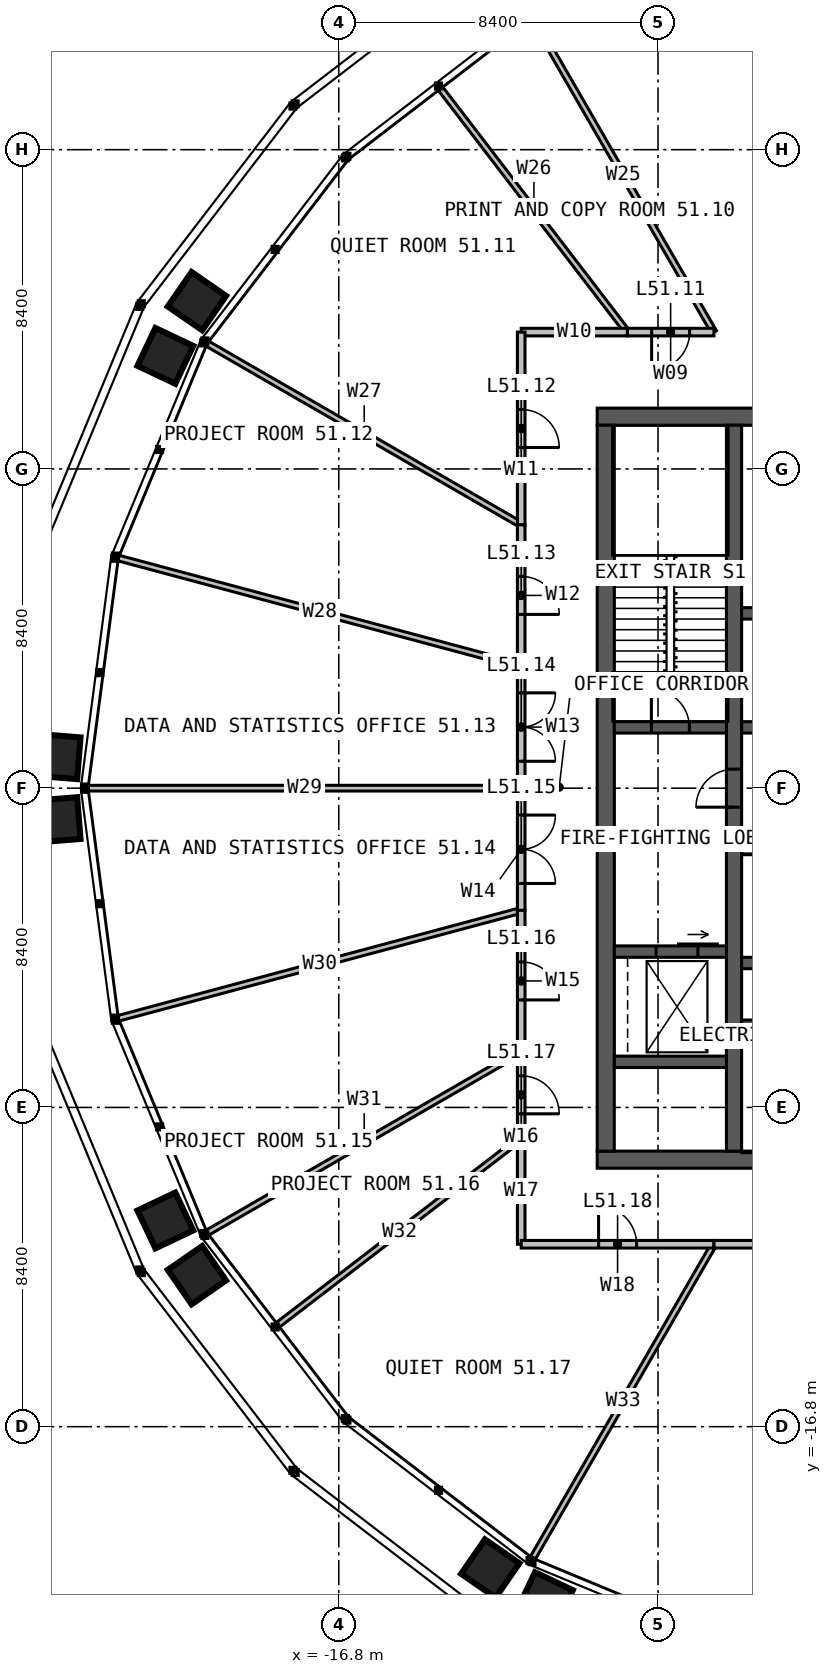
"""IFC4 building model, lengths in metres.
Left out: names, types, materials, properties, quantities, classifications, styles, units other than length and angle.
Written with IfcOpenShell. Run it as: python <this file> out.ifc"""

import sys

from ifc_helpers import new_model, si_unit, direction, frame, frame_2d, origin, place, context, subcontext, project, spatial, rectangle, extrude, element, fill, save


model = new_model("IFC4")
c1 = context("Model", 3, precision=1e-05, world=origin(), true_north=direction((0.0, 1.0)))
c2 = subcontext(c1, "Body", "Model", "MODEL_VIEW")
j1 = project(units=[si_unit("LENGTHUNIT", "METRE"), si_unit("PLANEANGLEUNIT", "RADIAN")], contexts=[c1])
p1 = place(None, origin())
s1 = spatial("IfcSite", under=j1, at=p1, CompositionType="ELEMENT")
p2 = place(p1, origin())
s2 = spatial("IfcBuilding", under=s1, at=p2, CompositionType="ELEMENT")
p3 = place(p2, frame((0.0, 0.0, 211.0)))
s3 = spatial("IfcBuildingStorey", under=s2, at=p3, CompositionType="ELEMENT", Elevation=211.0)
p4 = place(p3, frame((-10.0, 9.775, 0.0), z_axis=(0.0, 0.0, 1.0), x_axis=(1.0, 0.0, 0.0)))
e1 = element("IfcWall", 1, at=p4, inside=s3, PredefinedType="SOLIDWALL", context=c2, shape_type="SweptSolid", body=[
    extrude(rectangle(XDim=20.0, YDim=0.45, at=frame_2d((10.0, 0.0))), origin(), (0.0, 0.0, 1.0), 4.0),
])
p5 = place(p4, frame((9.4, 0.0, 0.0)))
e2 = element("IfcOpeningElement", 2, at=p5, cuts=e1, PredefinedType="OPENING", context=c2, shape_type="SweptSolid", body=[
    extrude(rectangle(XDim=1.2, YDim=2.2, at=frame_2d((0.6, 1.1))), frame((0.0, 0.235, 0.0), z_axis=(0.0, -1.0, 0.0), x_axis=(1.0, 0.0, 0.0)), (0.0, 0.0, 1.0), 0.47),
])
p6 = place(p3, frame((10.0, -9.775, 0.0), z_axis=(0.0, 0.0, 1.0), x_axis=(-1.0, 0.0, 0.0)))
e3 = element("IfcWall", 3, at=p6, inside=s3, PredefinedType="SOLIDWALL", context=c2, shape_type="SweptSolid", body=[
    extrude(rectangle(XDim=20.0, YDim=0.45, at=frame_2d((10.0, 0.0))), origin(), (0.0, 0.0, 1.0), 4.0),
])
p7 = place(p6, frame((6.875, 0.0, 0.0)))
e4 = element("IfcOpeningElement", 4, at=p7, cuts=e3, PredefinedType="OPENING", context=c2, shape_type="SweptSolid", body=[
    extrude(rectangle(XDim=1.2, YDim=2.2, at=frame_2d((0.6, 1.1))), frame((0.0, 0.235, 0.0), z_axis=(0.0, -1.0, 0.0), x_axis=(1.0, 0.0, 0.0)), (0.0, 0.0, 1.0), 0.47),
])
p8 = place(p3, frame((-9.775, 9.55, 0.0), z_axis=(0.0, 0.0, 1.0), x_axis=(0.0, -1.0, 0.0)))
e5 = element("IfcWall", 5, at=p8, inside=s3, PredefinedType="SOLIDWALL", context=c2, shape_type="SweptSolid", body=[
    extrude(rectangle(XDim=19.1, YDim=0.45, at=frame_2d((9.55, 0.0))), origin(), (0.0, 0.0, 1.0), 4.0),
])
p9 = place(p3, frame((-6.4, -9.55, 0.0), z_axis=(0.0, 0.0, 1.0), x_axis=(0.0, 1.0, 0.0)))
e6 = element("IfcWall", 6, at=p9, inside=s3, PredefinedType="SOLIDWALL", context=c2, shape_type="SweptSolid", body=[
    extrude(rectangle(XDim=19.1, YDim=0.4, at=frame_2d((9.55, 0.0))), origin(), (0.0, 0.0, 1.0), 4.0),
])
p10 = place(p9, frame((9.05, 0.0, 0.0)))
e7 = element("IfcOpeningElement", 7, at=p10, cuts=e6, PredefinedType="OPENING", context=c2, shape_type="SweptSolid", body=[
    extrude(rectangle(XDim=1.0, YDim=2.2, at=frame_2d((0.5, 1.1))), frame((0.0, 0.21, 0.0), z_axis=(0.0, -1.0, 0.0), x_axis=(1.0, 0.0, 0.0)), (0.0, 0.0, 1.0), 0.42),
])
p11 = place(p3, frame((-6.2, 1.6, 0.0), z_axis=(0.0, 0.0, 1.0), x_axis=(1.0, 0.0, 0.0)))
e8 = element("IfcWall", 8, at=p11, inside=s3, PredefinedType="SOLIDWALL", context=c2, shape_type="SweptSolid", body=[
    extrude(rectangle(XDim=4.85, YDim=0.3, at=frame_2d((2.425, 0.0))), origin(), (0.0, 0.0, 1.0), 4.0),
])
p12 = place(p11, frame((0.625, 0.0, 0.0)))
e9 = element("IfcOpeningElement", 9, at=p12, cuts=e8, PredefinedType="OPENING", context=c2, shape_type="SweptSolid", body=[
    extrude(rectangle(XDim=1.1, YDim=2.2, at=frame_2d((0.55, 1.1))), frame((0.0, 0.16, 0.0), z_axis=(0.0, -1.0, 0.0), x_axis=(1.0, 0.0, 0.0)), (0.0, 0.0, 1.0), 0.32),
])
p13 = place(p11, frame((3.15, 0.0, 0.0)))
e10 = element("IfcOpeningElement", 10, at=p13, cuts=e8, PredefinedType="OPENING", context=c2, shape_type="SweptSolid", body=[
    extrude(rectangle(XDim=1.1, YDim=2.2, at=frame_2d((0.55, 1.1))), frame((0.0, 0.16, 0.0), z_axis=(0.0, -1.0, 0.0), x_axis=(1.0, 0.0, 0.0)), (0.0, 0.0, 1.0), 0.32),
])
p14 = place(p3, frame((-6.2, 4.6, 0.0), z_axis=(0.0, 0.0, 1.0), x_axis=(1.0, 0.0, 0.0)))
e11 = element("IfcWall", 11, at=p14, inside=s3, PredefinedType="SOLIDWALL", context=c2, shape_type="SweptSolid", body=[
    extrude(rectangle(XDim=4.85, YDim=0.3, at=frame_2d((2.425, 0.0))), origin(), (0.0, 0.0, 1.0), 4.0),
])
for number, where, z_axis, x_axis in (
    (12, (-6.2, -1.6, 0.0), (0.0, 0.0, 1.0), (1.0, 0.0, 0.0)),
    (13, (-6.2, -4.6, 0.0), (0.0, 0.0, 1.0), (1.0, 0.0, 0.0)),
):
    element("IfcWall", number, at=place(p3, frame(where, z_axis=z_axis, x_axis=x_axis)), inside=s3, PredefinedType="SOLIDWALL", context=c2, shape_type="SweptSolid", body=[
        extrude(rectangle(XDim=7.4, YDim=0.3, at=frame_2d((3.7, 0.0))), origin(), (0.0, 0.0, 1.0), 4.0),
    ])
p15 = place(p3, frame((-6.2, -6.2, 0.0), z_axis=(0.0, 0.0, 1.0), x_axis=(1.0, 0.0, 0.0)))
e14 = element("IfcWall", 14, at=p15, inside=s3, PredefinedType="SOLIDWALL", context=c2, shape_type="SweptSolid", body=[
    extrude(rectangle(XDim=7.4, YDim=0.2, at=frame_2d((3.7, 0.0))), origin(), (0.0, 0.0, 1.0), 4.0),
])
p16 = place(p3, frame((-9.55, 1.6, 0.0), z_axis=(0.0, 0.0, 1.0), x_axis=(1.0, 0.0, 0.0)))
e15 = element("IfcWall", 15, at=p16, inside=s3, PredefinedType="SOLIDWALL", context=c2, shape_type="SweptSolid", body=[
    extrude(rectangle(XDim=2.95, YDim=0.3, at=frame_2d((1.475, 0.0))), origin(), (0.0, 0.0, 1.0), 4.0),
])
p17 = place(p16, frame((0.975, 0.0, 0.0)))
e16 = element("IfcOpeningElement", 16, at=p17, cuts=e15, PredefinedType="OPENING", context=c2, shape_type="SweptSolid", body=[
    extrude(rectangle(XDim=1.0, YDim=2.2, at=frame_2d((0.5, 1.1))), frame((0.0, 0.16, 0.0), z_axis=(0.0, -1.0, 0.0), x_axis=(1.0, 0.0, 0.0)), (0.0, 0.0, 1.0), 0.32),
])
p18 = place(p3, frame((-9.55, -4.3, 0.0), z_axis=(0.0, 0.0, 1.0), x_axis=(1.0, 0.0, 0.0)))
e17 = element("IfcWall", 17, at=p18, inside=s3, PredefinedType="SOLIDWALL", context=c2, shape_type="SweptSolid", body=[
    extrude(rectangle(XDim=2.95, YDim=0.3, at=frame_2d((1.475, 0.0))), origin(), (0.0, 0.0, 1.0), 4.0),
])
p19 = place(p18, frame((1.1, 0.0, 0.0)))
e18 = element("IfcOpeningElement", 18, at=p19, cuts=e17, PredefinedType="OPENING", context=c2, shape_type="SweptSolid", body=[
    extrude(rectangle(XDim=1.1, YDim=2.2, at=frame_2d((0.55, 1.1))), frame((0.0, 0.16, 0.0), z_axis=(0.0, -1.0, 0.0), x_axis=(1.0, 0.0, 0.0)), (0.0, 0.0, 1.0), 0.32),
])
p20 = place(p3, frame((-9.55, -7.2, 0.0), z_axis=(0.0, 0.0, 1.0), x_axis=(1.0, 0.0, 0.0)))
e19 = element("IfcWall", 19, at=p20, inside=s3, PredefinedType="SOLIDWALL", context=c2, shape_type="SweptSolid", body=[
    extrude(rectangle(XDim=2.95, YDim=0.3, at=frame_2d((1.475, 0.0))), origin(), (0.0, 0.0, 1.0), 4.0),
])
p21 = place(p3, frame((-3.215, 12.0, 0.0), z_axis=(0.0, 0.0, 1.0), x_axis=(-0.258822822076, 0.965924814244, 0.0)))
e20 = element("IfcWall", 20, at=p21, inside=s3, PredefinedType="PARTITIONING", context=c2, shape_type="SweptSolid", body=[
    extrude(rectangle(XDim=10.974, YDim=0.15, at=frame_2d((5.487, 0.0))), origin(), (0.0, 0.0, 1.0), 2.79),
])
p22 = place(p3, frame((-6.928, 12.0, 0.0), z_axis=(0.0, 0.0, 1.0), x_axis=(-0.50000302246, 0.866023658759, 0.0)))
e21 = element("IfcWall", 21, at=p22, inside=s3, PredefinedType="PARTITIONING", context=c2, shape_type="SweptSolid", body=[
    extrude(rectangle(XDim=9.541, YDim=0.15, at=frame_2d((4.771, 0.0))), origin(), (0.0, 0.0, 1.0), 2.79),
])
p23 = place(p3, frame((-9.208, 12.0, 0.0), z_axis=(0.0, 0.0, 1.0), x_axis=(-0.608757248883, 0.793356547797, 0.0)))
e22 = element("IfcWall", 22, at=p23, inside=s3, PredefinedType="PARTITIONING", context=c2, shape_type="SweptSolid", body=[
    extrude(rectangle(XDim=8.072, YDim=0.15, at=frame_2d((4.036, 0.0))), origin(), (0.0, 0.0, 1.0), 2.79),
])
p24 = place(p3, frame((-12.0, 6.928, 0.0), z_axis=(0.0, 0.0, 1.0), x_axis=(-0.866023658759, 0.50000302246, 0.0)))
e23 = element("IfcWall", 23, at=p24, inside=s3, PredefinedType="PARTITIONING", context=c2, shape_type="SweptSolid", body=[
    extrude(rectangle(XDim=9.541, YDim=0.15, at=frame_2d((4.771, 0.0))), origin(), (0.0, 0.0, 1.0), 2.79),
])
p25 = place(p3, frame((-12.0, 3.215, 0.0), z_axis=(0.0, 0.0, 1.0), x_axis=(-0.965924814244, 0.258822822076, 0.0)))
e24 = element("IfcWall", 24, at=p25, inside=s3, PredefinedType="PARTITIONING", context=c2, shape_type="SweptSolid", body=[
    extrude(rectangle(XDim=10.974, YDim=0.15, at=frame_2d((5.487, 0.0))), origin(), (0.0, 0.0, 1.0), 2.79),
])
p26 = place(p3, frame((-12.0, 0.0, 0.0), z_axis=(0.0, 0.0, 1.0), x_axis=(-1.0, 0.0, 0.0)))
e25 = element("IfcWall", 25, at=p26, inside=s3, PredefinedType="PARTITIONING", context=c2, shape_type="SweptSolid", body=[
    extrude(rectangle(XDim=11.397, YDim=0.15, at=frame_2d((5.699, 0.0))), origin(), (0.0, 0.0, 1.0), 2.79),
])
p27 = place(p3, frame((-12.0, -3.215, 0.0), z_axis=(0.0, 0.0, 1.0), x_axis=(-0.965924814244, -0.258822822076, 0.0)))
e26 = element("IfcWall", 26, at=p27, inside=s3, PredefinedType="PARTITIONING", context=c2, shape_type="SweptSolid", body=[
    extrude(rectangle(XDim=10.974, YDim=0.15, at=frame_2d((5.487, 0.0))), origin(), (0.0, 0.0, 1.0), 2.79),
])
p28 = place(p3, frame((-12.0, -6.928, 0.0), z_axis=(0.0, 0.0, 1.0), x_axis=(-0.866023658759, -0.50000302246, 0.0)))
e27 = element("IfcWall", 27, at=p28, inside=s3, PredefinedType="PARTITIONING", context=c2, shape_type="SweptSolid", body=[
    extrude(rectangle(XDim=9.541, YDim=0.15, at=frame_2d((4.771, 0.0))), origin(), (0.0, 0.0, 1.0), 2.79),
])
p29 = place(p3, frame((-12.0, -9.208, 0.0), z_axis=(0.0, 0.0, 1.0), x_axis=(-0.793356547797, -0.608757248883, 0.0)))
e28 = element("IfcWall", 28, at=p29, inside=s3, PredefinedType="PARTITIONING", context=c2, shape_type="SweptSolid", body=[
    extrude(rectangle(XDim=8.072, YDim=0.15, at=frame_2d((4.036, 0.0))), origin(), (0.0, 0.0, 1.0), 2.79),
])
p30 = place(p3, frame((-6.928, -12.0, 0.0), z_axis=(0.0, 0.0, 1.0), x_axis=(-0.50000302246, -0.866023658759, 0.0)))
e29 = element("IfcWall", 29, at=p30, inside=s3, PredefinedType="PARTITIONING", context=c2, shape_type="SweptSolid", body=[
    extrude(rectangle(XDim=9.541, YDim=0.15, at=frame_2d((4.771, 0.0))), origin(), (0.0, 0.0, 1.0), 2.79),
])
p31 = place(p3, frame((-6.928, 12.0, 0.0), z_axis=(0.0, 0.0, 1.0), x_axis=(-1.0, 0.0, 0.0)))
e30 = element("IfcWall", 30, at=p31, inside=s3, PredefinedType="PARTITIONING", context=c2, shape_type="SweptSolid", body=[
    extrude(rectangle(XDim=2.28, YDim=0.2, at=frame_2d((1.14, 0.0))), origin(), (0.0, 0.0, 1.0), 3.8),
])
p32 = place(p31, frame((0.64, 0.0, 0.0)))
e31 = element("IfcOpeningElement", 31, at=p32, cuts=e30, PredefinedType="OPENING", context=c2, shape_type="SweptSolid", body=[
    extrude(rectangle(XDim=1.0, YDim=2.2, at=frame_2d((0.5, 1.1))), frame((0.0, 0.11, 0.0), z_axis=(0.0, -1.0, 0.0), x_axis=(1.0, 0.0, 0.0)), (0.0, 0.0, 1.0), 0.22),
])
p33 = place(p3, frame((-9.208, 12.0, 0.0), z_axis=(0.0, 0.0, 1.0), x_axis=(-1.0, 0.0, 0.0)))
e32 = element("IfcWall", 32, at=p33, inside=s3, PredefinedType="PARTITIONING", context=c2, shape_type="SweptSolid", body=[
    extrude(rectangle(XDim=2.792, YDim=0.2, at=frame_2d((1.396, 0.0))), origin(), (0.0, 0.0, 1.0), 3.8),
])
p34 = place(p3, frame((-12.0, 12.0, 0.0), z_axis=(0.0, 0.0, 1.0), x_axis=(0.0, -1.0, 0.0)))
e33 = element("IfcWall", 33, at=p34, inside=s3, PredefinedType="PARTITIONING", context=c2, shape_type="SweptSolid", body=[
    extrude(rectangle(XDim=5.072, YDim=0.2, at=frame_2d((2.536, 0.0))), origin(), (0.0, 0.0, 1.0), 3.8),
])
p35 = place(p34, frame((2.036, 0.0, 0.0)))
e34 = element("IfcOpeningElement", 34, at=p35, cuts=e33, PredefinedType="OPENING", context=c2, shape_type="SweptSolid", body=[
    extrude(rectangle(XDim=1.0, YDim=2.2, at=frame_2d((0.5, 1.1))), frame((0.0, 0.11, 0.0), z_axis=(0.0, -1.0, 0.0), x_axis=(1.0, 0.0, 0.0)), (0.0, 0.0, 1.0), 0.22),
])
p36 = place(p3, frame((-12.0, 6.928, 0.0), z_axis=(0.0, 0.0, 1.0), x_axis=(0.0, -1.0, 0.0)))
e35 = element("IfcWall", 35, at=p36, inside=s3, PredefinedType="PARTITIONING", context=c2, shape_type="SweptSolid", body=[
    extrude(rectangle(XDim=3.713, YDim=0.2, at=frame_2d((1.856, 0.0))), origin(), (0.0, 0.0, 1.0), 3.8),
])
p37 = place(p36, frame((1.356, 0.0, 0.0)))
e36 = element("IfcOpeningElement", 36, at=p37, cuts=e35, PredefinedType="OPENING", context=c2, shape_type="SweptSolid", body=[
    extrude(rectangle(XDim=1.0, YDim=2.2, at=frame_2d((0.5, 1.1))), frame((0.0, 0.11, 0.0), z_axis=(0.0, -1.0, 0.0), x_axis=(1.0, 0.0, 0.0)), (0.0, 0.0, 1.0), 0.22),
])
p38 = place(p3, frame((-12.0, 3.215, 0.0), z_axis=(0.0, 0.0, 1.0), x_axis=(0.0, -1.0, 0.0)))
e37 = element("IfcWall", 37, at=p38, inside=s3, PredefinedType="PARTITIONING", context=c2, shape_type="SweptSolid", body=[
    extrude(rectangle(XDim=3.215, YDim=0.2, at=frame_2d((1.608, 0.0))), origin(), (0.0, 0.0, 1.0), 3.8),
])
p39 = place(p38, frame((0.708, 0.0, 0.0)))
e38 = element("IfcOpeningElement", 38, at=p39, cuts=e37, PredefinedType="OPENING", context=c2, shape_type="SweptSolid", body=[
    extrude(rectangle(XDim=1.8, YDim=2.2, at=frame_2d((0.9, 1.1))), frame((0.0, 0.11, 0.0), z_axis=(0.0, -1.0, 0.0), x_axis=(1.0, 0.0, 0.0)), (0.0, 0.0, 1.0), 0.22),
])
p40 = place(p3, frame((-12.0, 0.0, 0.0), z_axis=(0.0, 0.0, 1.0), x_axis=(0.0, -1.0, 0.0)))
e39 = element("IfcWall", 39, at=p40, inside=s3, PredefinedType="PARTITIONING", context=c2, shape_type="SweptSolid", body=[
    extrude(rectangle(XDim=3.215, YDim=0.2, at=frame_2d((1.608, 0.0))), origin(), (0.0, 0.0, 1.0), 3.8),
])
p41 = place(p40, frame((0.708, 0.0, 0.0)))
e40 = element("IfcOpeningElement", 40, at=p41, cuts=e39, PredefinedType="OPENING", context=c2, shape_type="SweptSolid", body=[
    extrude(rectangle(XDim=1.8, YDim=2.2, at=frame_2d((0.9, 1.1))), frame((0.0, 0.11, 0.0), z_axis=(0.0, -1.0, 0.0), x_axis=(1.0, 0.0, 0.0)), (0.0, 0.0, 1.0), 0.22),
])
p42 = place(p3, frame((-12.0, -3.215, 0.0), z_axis=(0.0, 0.0, 1.0), x_axis=(0.0, -1.0, 0.0)))
e41 = element("IfcWall", 41, at=p42, inside=s3, PredefinedType="PARTITIONING", context=c2, shape_type="SweptSolid", body=[
    extrude(rectangle(XDim=3.713, YDim=0.2, at=frame_2d((1.856, 0.0))), origin(), (0.0, 0.0, 1.0), 3.8),
])
p43 = place(p42, frame((1.356, 0.0, 0.0)))
e42 = element("IfcOpeningElement", 42, at=p43, cuts=e41, PredefinedType="OPENING", context=c2, shape_type="SweptSolid", body=[
    extrude(rectangle(XDim=1.0, YDim=2.2, at=frame_2d((0.5, 1.1))), frame((0.0, 0.11, 0.0), z_axis=(0.0, -1.0, 0.0), x_axis=(1.0, 0.0, 0.0)), (0.0, 0.0, 1.0), 0.22),
])
p44 = place(p3, frame((-12.0, -6.928, 0.0), z_axis=(0.0, 0.0, 1.0), x_axis=(0.0, -1.0, 0.0)))
e43 = element("IfcWall", 43, at=p44, inside=s3, PredefinedType="PARTITIONING", context=c2, shape_type="SweptSolid", body=[
    extrude(rectangle(XDim=2.28, YDim=0.2, at=frame_2d((1.14, 0.0))), origin(), (0.0, 0.0, 1.0), 3.8),
])
p45 = place(p44, frame((0.64, 0.0, 0.0)))
e44 = element("IfcOpeningElement", 44, at=p45, cuts=e43, PredefinedType="OPENING", context=c2, shape_type="SweptSolid", body=[
    extrude(rectangle(XDim=1.0, YDim=2.2, at=frame_2d((0.5, 1.1))), frame((0.0, 0.11, 0.0), z_axis=(0.0, -1.0, 0.0), x_axis=(1.0, 0.0, 0.0)), (0.0, 0.0, 1.0), 0.22),
])
p46 = place(p3, frame((-12.0, -9.208, 0.0), z_axis=(0.0, 0.0, 1.0), x_axis=(0.0, -1.0, 0.0)))
e45 = element("IfcWall", 45, at=p46, inside=s3, PredefinedType="PARTITIONING", context=c2, shape_type="SweptSolid", body=[
    extrude(rectangle(XDim=2.792, YDim=0.2, at=frame_2d((1.396, 0.0))), origin(), (0.0, 0.0, 1.0), 3.8),
])
p47 = place(p3, frame((-12.0, -12.0, 0.0), z_axis=(0.0, 0.0, 1.0), x_axis=(1.0, 0.0, 0.0)))
e46 = element("IfcWall", 46, at=p47, inside=s3, PredefinedType="PARTITIONING", context=c2, shape_type="SweptSolid", body=[
    extrude(rectangle(XDim=5.072, YDim=0.2, at=frame_2d((2.536, 0.0))), origin(), (0.0, 0.0, 1.0), 3.8),
])
p48 = place(p47, frame((2.036, 0.0, 0.0)))
e47 = element("IfcOpeningElement", 47, at=p48, cuts=e46, PredefinedType="OPENING", context=c2, shape_type="SweptSolid", body=[
    extrude(rectangle(XDim=1.0, YDim=2.2, at=frame_2d((0.5, 1.1))), frame((0.0, 0.11, 0.0), z_axis=(0.0, -1.0, 0.0), x_axis=(1.0, 0.0, 0.0)), (0.0, 0.0, 1.0), 0.22),
])
p49 = place(p3, frame((-6.928, -12.0, 0.0), z_axis=(0.0, 0.0, 1.0), x_axis=(1.0, 0.0, 0.0)))
e48 = element("IfcWall", 48, at=p49, inside=s3, PredefinedType="PARTITIONING", context=c2, shape_type="SweptSolid", body=[
    extrude(rectangle(XDim=13.856, YDim=0.2, at=frame_2d((6.928, 0.0))), origin(), (0.0, 0.0, 1.0), 3.8),
])
p50 = place(p49, frame((6.028, 0.0, 0.0)))
e49 = element("IfcOpeningElement", 49, at=p50, cuts=e48, PredefinedType="OPENING", context=c2, shape_type="SweptSolid", body=[
    extrude(rectangle(XDim=1.8, YDim=2.2, at=frame_2d((0.9, 1.1))), frame((0.0, 0.11, 0.0), z_axis=(0.0, -1.0, 0.0), x_axis=(1.0, 0.0, 0.0)), (0.0, 0.0, 1.0), 0.22),
])
p51 = place(p10, origin())
e50 = element("IfcDoor", 50, at=p51, inside=s3, OperationType="SINGLE_SWING_LEFT", PredefinedType="DOOR", context=c2, shape_type="SweptSolid", body=[
    extrude(rectangle(XDim=1.0, YDim=2.2, at=frame_2d((0.5, 1.1))), frame((0.0, 0.025, 0.0), z_axis=(0.0, -1.0, 0.0), x_axis=(1.0, 0.0, 0.0)), (0.0, 0.0, 1.0), 0.05),
])
fill(e7, e50)
p52 = place(p17, origin())
e51 = element("IfcDoor", 51, at=p52, inside=s3, OperationType="SINGLE_SWING_LEFT", PredefinedType="DOOR", context=c2, shape_type="SweptSolid", body=[
    extrude(rectangle(XDim=1.0, YDim=2.2, at=frame_2d((0.5, 1.1))), frame((0.0, 0.025, 0.0), z_axis=(0.0, -1.0, 0.0), x_axis=(1.0, 0.0, 0.0)), (0.0, 0.0, 1.0), 0.05),
])
fill(e16, e51)
p53 = place(p19, origin())
e52 = element("IfcDoor", 52, at=p53, inside=s3, OperationType="SLIDING_TO_LEFT", PredefinedType="DOOR", context=c2, shape_type="SweptSolid", body=[
    extrude(rectangle(XDim=1.1, YDim=2.2, at=frame_2d((0.55, 1.1))), frame((0.0, 0.025, 0.0), z_axis=(0.0, -1.0, 0.0), x_axis=(1.0, 0.0, 0.0)), (0.0, 0.0, 1.0), 0.05),
])
fill(e18, e52)
p54 = place(p32, origin())
e53 = element("IfcDoor", 53, at=p54, inside=s3, OperationType="SINGLE_SWING_RIGHT", PredefinedType="DOOR", context=c2, shape_type="SweptSolid", body=[
    extrude(rectangle(XDim=1.0, YDim=2.2, at=frame_2d((0.5, 1.1))), frame((0.0, 0.025, 0.0), z_axis=(0.0, -1.0, 0.0), x_axis=(1.0, 0.0, 0.0)), (0.0, 0.0, 1.0), 0.05),
])
fill(e31, e53)
p55 = place(p35, origin())
e54 = element("IfcDoor", 54, at=p55, inside=s3, OperationType="SINGLE_SWING_RIGHT", PredefinedType="DOOR", context=c2, shape_type="SweptSolid", body=[
    extrude(rectangle(XDim=1.0, YDim=2.2, at=frame_2d((0.5, 1.1))), frame((0.0, 0.025, 0.0), z_axis=(0.0, -1.0, 0.0), x_axis=(1.0, 0.0, 0.0)), (0.0, 0.0, 1.0), 0.05),
])
fill(e34, e54)
p56 = place(p37, origin())
e55 = element("IfcDoor", 55, at=p56, inside=s3, OperationType="SINGLE_SWING_RIGHT", PredefinedType="DOOR", context=c2, shape_type="SweptSolid", body=[
    extrude(rectangle(XDim=1.0, YDim=2.2, at=frame_2d((0.5, 1.1))), frame((0.0, 0.025, 0.0), z_axis=(0.0, -1.0, 0.0), x_axis=(1.0, 0.0, 0.0)), (0.0, 0.0, 1.0), 0.05),
])
fill(e36, e55)
p57 = place(p39, origin())
e56 = element("IfcDoor", 56, at=p57, inside=s3, OperationType="DOUBLE_DOOR_SINGLE_SWING", PredefinedType="DOOR", context=c2, shape_type="SweptSolid", body=[
    extrude(rectangle(XDim=1.8, YDim=2.2, at=frame_2d((0.9, 1.1))), frame((0.0, 0.025, 0.0), z_axis=(0.0, -1.0, 0.0), x_axis=(1.0, 0.0, 0.0)), (0.0, 0.0, 1.0), 0.05),
])
fill(e38, e56)
p58 = place(p41, origin())
e57 = element("IfcDoor", 57, at=p58, inside=s3, OperationType="DOUBLE_DOOR_SINGLE_SWING", PredefinedType="DOOR", context=c2, shape_type="SweptSolid", body=[
    extrude(rectangle(XDim=1.8, YDim=2.2, at=frame_2d((0.9, 1.1))), frame((0.0, 0.025, 0.0), z_axis=(0.0, -1.0, 0.0), x_axis=(1.0, 0.0, 0.0)), (0.0, 0.0, 1.0), 0.05),
])
fill(e40, e57)
p59 = place(p43, origin())
e58 = element("IfcDoor", 58, at=p59, inside=s3, OperationType="SINGLE_SWING_RIGHT", PredefinedType="DOOR", context=c2, shape_type="SweptSolid", body=[
    extrude(rectangle(XDim=1.0, YDim=2.2, at=frame_2d((0.5, 1.1))), frame((0.0, 0.025, 0.0), z_axis=(0.0, -1.0, 0.0), x_axis=(1.0, 0.0, 0.0)), (0.0, 0.0, 1.0), 0.05),
])
fill(e42, e58)
p60 = place(p45, origin())
e59 = element("IfcDoor", 59, at=p60, inside=s3, OperationType="SINGLE_SWING_RIGHT", PredefinedType="DOOR", context=c2, shape_type="SweptSolid", body=[
    extrude(rectangle(XDim=1.0, YDim=2.2, at=frame_2d((0.5, 1.1))), frame((0.0, 0.025, 0.0), z_axis=(0.0, -1.0, 0.0), x_axis=(1.0, 0.0, 0.0)), (0.0, 0.0, 1.0), 0.05),
])
fill(e44, e59)
p61 = place(p48, origin())
e60 = element("IfcDoor", 60, at=p61, inside=s3, OperationType="SINGLE_SWING_LEFT", PredefinedType="DOOR", context=c2, shape_type="SweptSolid", body=[
    extrude(rectangle(XDim=1.0, YDim=2.2, at=frame_2d((0.5, 1.1))), frame((0.0, 0.025, 0.0), z_axis=(0.0, -1.0, 0.0), x_axis=(1.0, 0.0, 0.0)), (0.0, 0.0, 1.0), 0.05),
])
fill(e47, e60)
save(model, sys.argv[1])
